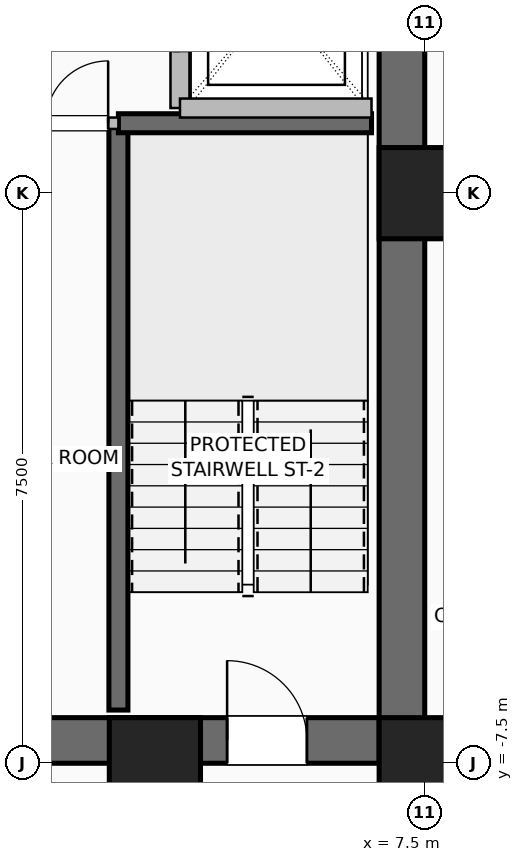
"""IFC4 building model, lengths in metres.
Left out: names, types, materials, properties, quantities, classifications, styles, units other than length and angle.
Written with IfcOpenShell. Run it as: python <this file> out.ifc"""

import sys

from ifc_helpers import new_model, si_unit, direction, frame, frame_2d, origin, origin_2d, place, context, subcontext, project, spatial, rectangle, hollow_rectangle, extrude, element, fill, save


model = new_model("IFC4")
c1 = context("Model", 3, precision=1e-05, world=origin(), true_north=direction((0.0, 1.0)))
c2 = subcontext(c1, "Body", "Model", "MODEL_VIEW")
j1 = project(units=[si_unit("LENGTHUNIT", "METRE"), si_unit("PLANEANGLEUNIT", "RADIAN")], contexts=[c1])
p1 = place(None, origin())
s1 = spatial("IfcSite", under=j1, at=p1, CompositionType="ELEMENT")
p2 = place(p1, origin())
s2 = spatial("IfcBuilding", under=s1, at=p2, CompositionType="ELEMENT")
p3 = place(p2, frame((0.0, 0.0, 55.0)))
s3 = spatial("IfcBuildingStorey", under=s2, at=p3, CompositionType="ELEMENT", Elevation=55.0)
for number, where, z_axis, x_axis in (
    (1, (3.95, -7.5, 0.0), (0.0, 0.0, 1.0), (1.0, 0.0, 0.0)),
    (2, (7.5, -7.5, 0.0), (0.0, 0.0, 1.0), (1.0, 0.0, 0.0)),
    (3, (7.5, 0.0, 0.0), (0.0, 0.0, 1.0), (1.0, 0.0, 0.0)),
):
    element("IfcColumn", number, at=place(p3, frame(where, z_axis=z_axis, x_axis=x_axis)), inside=s3, PredefinedType="COLUMN", context=c2, shape_type="SweptSolid", body=[
        extrude(hollow_rectangle(XDim=1.2, YDim=1.2, WallThickness=0.055, at=origin_2d()), origin(), (0.0, 0.0, 1.0), 3.5),
    ])
p4 = place(p3, frame((-7.5, -7.2, 0.0), z_axis=(0.0, 0.0, 1.0), x_axis=(1.0, 0.0, 0.0)))
e4 = element("IfcWall", 4, at=p4, inside=s3, PredefinedType="SHEAR", context=c2, shape_type="SweptSolid", body=[
    extrude(rectangle(XDim=15.0, YDim=0.6, at=frame_2d((7.5, 0.0))), origin(), (0.0, 0.0, 1.0), 3.25),
])
p5 = place(p4, frame((1.55, 0.0, 0.0)))
e5 = element("IfcOpeningElement", 5, at=p5, cuts=e4, PredefinedType="OPENING", context=c2, shape_type="SweptSolid", body=[
    extrude(rectangle(XDim=1.05, YDim=2.08, at=frame_2d((0.525, 1.04))), frame((0.0, 0.31, 0.0), z_axis=(0.0, -1.0, 0.0), x_axis=(1.0, 0.0, 0.0)), (0.0, 0.0, 1.0), 0.62),
])
p6 = place(p4, frame((12.4, 0.0, 0.0)))
e6 = element("IfcOpeningElement", 6, at=p6, cuts=e4, PredefinedType="OPENING", context=c2, shape_type="SweptSolid", body=[
    extrude(rectangle(XDim=1.05, YDim=2.08, at=frame_2d((0.525, 1.04))), frame((0.0, 0.31, 0.0), z_axis=(0.0, -1.0, 0.0), x_axis=(1.0, 0.0, 0.0)), (0.0, 0.0, 1.0), 0.62),
])
p7 = place(p4, frame((4.64, 0.0, 0.0)))
e7 = element("IfcOpeningElement", 7, at=p7, cuts=e4, PredefinedType="OPENING", context=c2, shape_type="SweptSolid", body=[
    extrude(rectangle(XDim=1.1, YDim=2.2, at=frame_2d((0.55, 1.1))), frame((0.0, 0.31, 0.0), z_axis=(0.0, -1.0, 0.0), x_axis=(1.0, 0.0, 0.0)), (0.0, 0.0, 1.0), 0.62),
])
p8 = place(p4, frame((6.52, 0.0, 0.0)))
e8 = element("IfcOpeningElement", 8, at=p8, cuts=e4, PredefinedType="OPENING", context=c2, shape_type="SweptSolid", body=[
    extrude(rectangle(XDim=1.1, YDim=2.2, at=frame_2d((0.55, 1.1))), frame((0.0, 0.31, 0.0), z_axis=(0.0, -1.0, 0.0), x_axis=(1.0, 0.0, 0.0)), (0.0, 0.0, 1.0), 0.62),
])
p9 = place(p4, frame((8.4, 0.0, 0.0)))
e9 = element("IfcOpeningElement", 9, at=p9, cuts=e4, PredefinedType="OPENING", context=c2, shape_type="SweptSolid", body=[
    extrude(rectangle(XDim=1.1, YDim=2.2, at=frame_2d((0.55, 1.1))), frame((0.0, 0.31, 0.0), z_axis=(0.0, -1.0, 0.0), x_axis=(1.0, 0.0, 0.0)), (0.0, 0.0, 1.0), 0.62),
])
p10 = place(p3, frame((7.2, -7.5, 0.0), z_axis=(0.0, 0.0, 1.0), x_axis=(0.0, 1.0, 0.0)))
e10 = element("IfcWall", 10, at=p10, inside=s3, PredefinedType="SHEAR", context=c2, shape_type="SweptSolid", body=[
    extrude(rectangle(XDim=15.0, YDim=0.6, at=frame_2d((7.5, 0.0))), origin(), (0.0, 0.0, 1.0), 3.25),
])
p11 = place(p3, frame((3.47, -6.8, 0.0), z_axis=(0.0, 0.0, 1.0), x_axis=(0.0, 1.0, 0.0)))
e11 = element("IfcWall", 11, at=p11, inside=s3, PredefinedType="SHEAR", context=c2, shape_type="SweptSolid", body=[
    extrude(rectangle(XDim=7.72, YDim=0.25, at=frame_2d((3.86, 0.0))), origin(), (0.0, 0.0, 1.0), 3.25),
])
p12 = place(p3, frame((3.47, 0.92, 0.0), z_axis=(0.0, 0.0, 1.0), x_axis=(1.0, 0.0, 0.0)))
e12 = element("IfcWall", 12, at=p12, inside=s3, PredefinedType="SHEAR", context=c2, shape_type="SweptSolid", body=[
    extrude(rectangle(XDim=3.33, YDim=0.25, at=frame_2d((1.665, 0.0))), origin(), (0.0, 0.0, 1.0), 3.25),
])
p13 = place(p3, frame((4.28, 1.12, 0.0), z_axis=(0.0, 0.0, 1.0), x_axis=(0.0, 1.0, 0.0)))
e13 = element("IfcWall", 13, at=p13, inside=s3, PredefinedType="SHEAR", context=c2, shape_type="SweptSolid", body=[
    extrude(rectangle(XDim=2.9, YDim=0.25, at=frame_2d((1.45, 0.0))), origin(), (0.0, 0.0, 1.0), 3.25),
])
p14 = place(p13, frame((0.75, 0.0, 0.0)))
e14 = element("IfcOpeningElement", 14, at=p14, cuts=e13, PredefinedType="OPENING", context=c2, shape_type="SweptSolid", body=[
    extrude(rectangle(XDim=1.3, YDim=2.3, at=frame_2d((0.65, 1.15))), frame((0.0, 0.135, 0.0), z_axis=(0.0, -1.0, 0.0), x_axis=(1.0, 0.0, 0.0)), (0.0, 0.0, 1.0), 0.27),
])
p15 = place(p3, frame((4.28, 1.12, 0.0), z_axis=(0.0, 0.0, 1.0), x_axis=(1.0, 0.0, 0.0)))
e15 = element("IfcWall", 15, at=p15, inside=s3, PredefinedType="SHEAR", context=c2, shape_type="SweptSolid", body=[
    extrude(rectangle(XDim=2.52, YDim=0.25, at=frame_2d((1.26, 0.0))), origin(), (0.0, 0.0, 1.0), 3.25),
])
p16 = place(p3, frame((2.38, 0.92, 0.0), z_axis=(0.0, 0.0, 1.0), x_axis=(1.0, 0.0, 0.0)))
e16 = element("IfcWall", 16, at=p16, inside=s3, PredefinedType="PARTITIONING", context=c2, shape_type="SweptSolid", body=[
    extrude(rectangle(XDim=1.09, YDim=0.15, at=frame_2d((0.545, 0.0))), origin(), (0.0, 0.0, 1.0), 3.25),
])
p17 = place(p16, frame((0.135, 0.0, 0.0)))
e17 = element("IfcOpeningElement", 17, at=p17, cuts=e16, PredefinedType="OPENING", context=c2, shape_type="SweptSolid", body=[
    extrude(rectangle(XDim=0.82, YDim=2.05, at=frame_2d((0.41, 1.025))), frame((0.0, 0.085, 0.0), z_axis=(0.0, -1.0, 0.0), x_axis=(1.0, 0.0, 0.0)), (0.0, 0.0, 1.0), 0.17),
])
p18 = place(p6, origin())
e18 = element("IfcDoor", 18, at=p18, inside=s3, OperationType="SINGLE_SWING_LEFT", PredefinedType="DOOR", context=c2, shape_type="SweptSolid", body=[
    extrude(rectangle(XDim=1.05, YDim=2.08, at=frame_2d((0.525, 1.04))), frame((0.0, 0.025, 0.0), z_axis=(0.0, -1.0, 0.0), x_axis=(1.0, 0.0, 0.0)), (0.0, 0.0, 1.0), 0.05),
])
fill(e6, e18)
p19 = place(p17, origin())
e19 = element("IfcDoor", 19, at=p19, inside=s3, OperationType="SINGLE_SWING_RIGHT", PredefinedType="DOOR", context=c2, shape_type="SweptSolid", body=[
    extrude(rectangle(XDim=0.82, YDim=2.05, at=frame_2d((0.41, 1.025))), frame((0.0, 0.025, 0.0), z_axis=(0.0, -1.0, 0.0), x_axis=(1.0, 0.0, 0.0)), (0.0, 0.0, 1.0), 0.05),
])
fill(e17, e19)
save(model, sys.argv[1])
